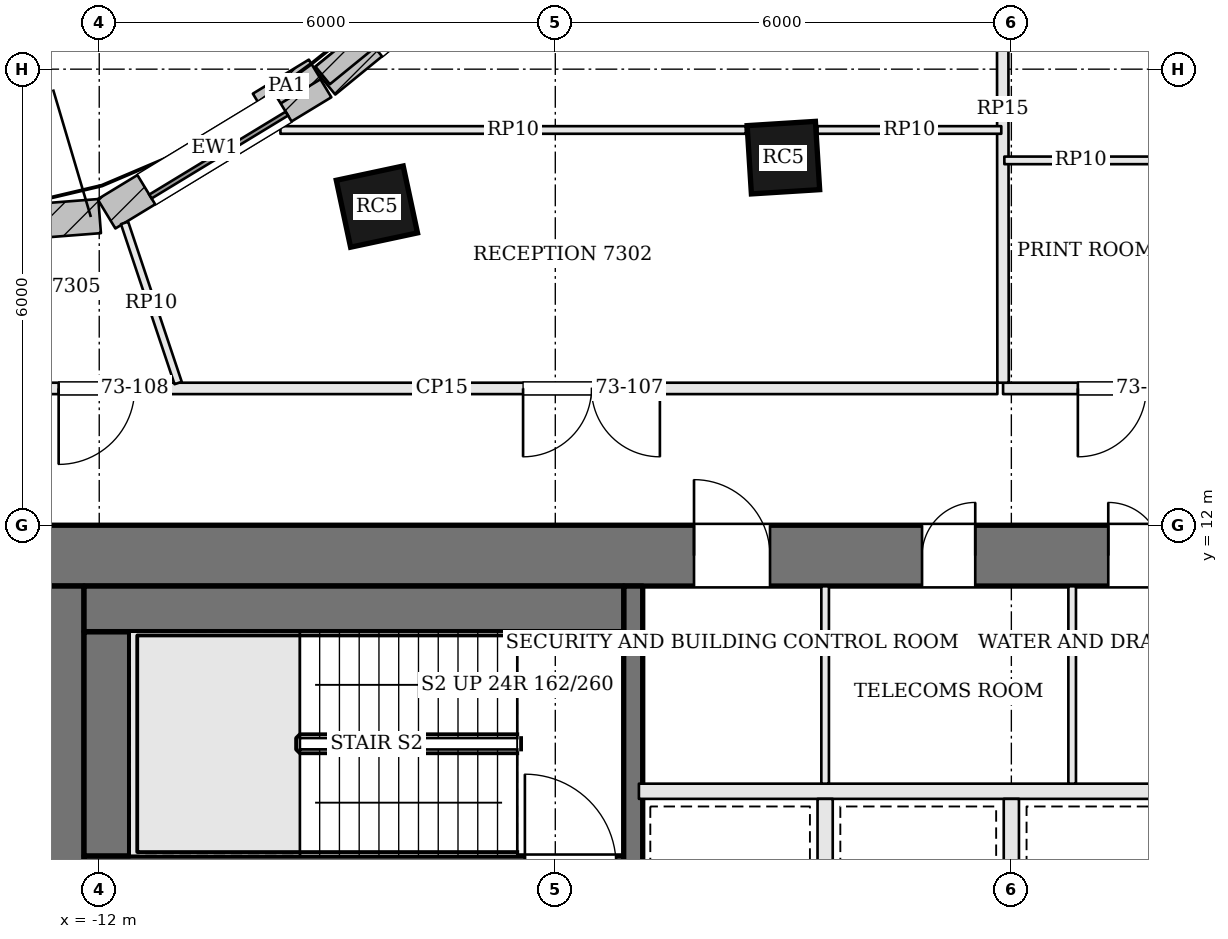
"""IFC4 building model, lengths in metres.
Left out: names, types, materials, properties, quantities, classifications, styles, units other than length and angle.
Written with IfcOpenShell. Run it as: python <this file> out.ifc"""

import sys

from ifc_helpers import new_model, si_unit, direction, frame, frame_2d, origin, origin_2d, place, context, subcontext, project, spatial, rectangle, extrude, element, fill, save


model = new_model("IFC4")
c1 = context("Model", 3, precision=1e-05, world=origin(), true_north=direction((0.0, 1.0)))
c2 = subcontext(c1, "Body", "Model", "MODEL_VIEW")
j1 = project(units=[si_unit("LENGTHUNIT", "METRE"), si_unit("PLANEANGLEUNIT", "RADIAN")], contexts=[c1])
p1 = place(None, origin())
s1 = spatial("IfcSite", under=j1, at=p1, CompositionType="ELEMENT")
p2 = place(p1, origin())
s2 = spatial("IfcBuilding", under=s1, at=p2, CompositionType="ELEMENT")
p3 = place(p2, frame((0.0, 0.0, 296.1)))
s3 = spatial("IfcBuildingStorey", under=s2, at=p3, CompositionType="ELEMENT", Elevation=296.1)
p4 = place(p3, frame((-13.0, 11.6, 0.0), z_axis=(0.0, 0.0, 1.0), x_axis=(1.0, 0.0, 0.0)))
e1 = element("IfcWall", 1, at=p4, inside=s3, PredefinedType="SHEAR", context=c2, shape_type="SweptSolid", body=[
    extrude(rectangle(XDim=26.0, YDim=0.8, at=frame_2d((13.0, 0.0))), origin(), (0.0, 0.0, 1.0), 3.9),
])
p5 = place(p4, frame((8.825, 0.0, 0.0)))
e2 = element("IfcOpeningElement", 2, at=p5, cuts=e1, PredefinedType="OPENING", context=c2, shape_type="SweptSolid", body=[
    extrude(rectangle(XDim=1.0, YDim=2.1, at=frame_2d((0.5, 1.05))), frame((0.0, 0.41, 0.0), z_axis=(0.0, -1.0, 0.0), x_axis=(1.0, 0.0, 0.0)), (0.0, 0.0, 1.0), 0.82),
])
p6 = place(p4, frame((11.825, 0.0, 0.0)))
e3 = element("IfcOpeningElement", 3, at=p6, cuts=e1, PredefinedType="OPENING", context=c2, shape_type="SweptSolid", body=[
    extrude(rectangle(XDim=0.7, YDim=2.1, at=frame_2d((0.35, 1.05))), frame((0.0, 0.41, 0.0), z_axis=(0.0, -1.0, 0.0), x_axis=(1.0, 0.0, 0.0)), (0.0, 0.0, 1.0), 0.82),
])
p7 = place(p4, frame((14.275, 0.0, 0.0)))
e4 = element("IfcOpeningElement", 4, at=p7, cuts=e1, PredefinedType="OPENING", context=c2, shape_type="SweptSolid", body=[
    extrude(rectangle(XDim=0.7, YDim=2.1, at=frame_2d((0.35, 1.05))), frame((0.0, 0.41, 0.0), z_axis=(0.0, -1.0, 0.0), x_axis=(1.0, 0.0, 0.0)), (0.0, 0.0, 1.0), 0.82),
])
p8 = place(p4, frame((16.175, 0.0, 0.0)))
e5 = element("IfcOpeningElement", 5, at=p8, cuts=e1, PredefinedType="OPENING", context=c2, shape_type="SweptSolid", body=[
    extrude(rectangle(XDim=1.0, YDim=2.1, at=frame_2d((0.5, 1.05))), frame((0.0, 0.41, 0.0), z_axis=(0.0, -1.0, 0.0), x_axis=(1.0, 0.0, 0.0)), (0.0, 0.0, 1.0), 0.82),
])
p9 = place(p3, frame((-12.6, -2.2, 0.0), z_axis=(0.0, 0.0, 1.0), x_axis=(0.0, 1.0, 0.0)))
e6 = element("IfcWall", 6, at=p9, inside=s3, PredefinedType="SHEAR", context=c2, shape_type="SweptSolid", body=[
    extrude(rectangle(XDim=13.4, YDim=0.8, at=frame_2d((6.7, 0.0))), origin(), (0.0, 0.0, 1.0), 3.9),
])
p10 = place(p9, frame((4.2, 0.0, 0.0)))
e7 = element("IfcOpeningElement", 7, at=p10, cuts=e6, PredefinedType="OPENING", context=c2, shape_type="SweptSolid", body=[
    extrude(rectangle(XDim=1.8, YDim=2.1, at=frame_2d((0.9, 1.05))), frame((0.0, 0.41, 0.0), z_axis=(0.0, -1.0, 0.0), x_axis=(1.0, 0.0, 0.0)), (0.0, 0.0, 1.0), 0.82),
])
for number, where, z_axis, x_axis in (
    (8, (-2.999, 16.836, 0.0), (0.0, 0.0, 1.0), (-0.998, -0.062, 0.0)),
    (9, (-8.347, 16.192, 0.0), (0.0, 0.0, 1.0), (-0.978, -0.209, 0.0)),
):
    element("IfcColumn", number, at=place(p3, frame(where, z_axis=z_axis, x_axis=x_axis)), inside=s3, PredefinedType="COLUMN", context=c2, shape_type="SweptSolid", body=[
        extrude(rectangle(XDim=0.9, YDim=0.9, at=origin_2d()), origin(), (0.0, 0.0, 1.0), 3.9),
    ])
p11 = place(p3, frame((-6.411, 19.983, 0.0), z_axis=(0.0, 0.0, 1.0), x_axis=(-0.774810240287, -0.632193871804, 0.0)))
e10 = element("IfcWall", 10, at=p11, inside=s3, PredefinedType="SOLIDWALL", context=c2, shape_type="SweptSolid", body=[
    extrude(rectangle(XDim=3.389, YDim=0.45, at=frame_2d((1.695, 0.0))), origin(), (0.0, 0.0, 1.0), 3.7),
])
p12 = place(p11, frame((0.795, 0.0, 0.9)))
e11 = element("IfcOpeningElement", 11, at=p12, cuts=e10, PredefinedType="OPENING", context=c2, shape_type="SweptSolid", body=[
    extrude(rectangle(XDim=1.8, YDim=2.3, at=frame_2d((0.9, 1.15))), frame((0.0, 0.235, 0.0), z_axis=(0.0, -1.0, 0.0), x_axis=(1.0, 0.0, 0.0)), (0.0, 0.0, 1.0), 0.47),
])
p13 = place(p3, frame((-9.063, 17.823, 0.0), z_axis=(0.0, 0.0, 1.0), x_axis=(-0.854622263029, -0.519250216693, 0.0)))
e12 = element("IfcWall", 12, at=p13, inside=s3, PredefinedType="SOLIDWALL", context=c2, shape_type="SweptSolid", body=[
    extrude(rectangle(XDim=3.325, YDim=0.45, at=frame_2d((1.662, 0.0))), origin(), (0.0, 0.0, 1.0), 3.7),
])
p14 = place(p13, frame((0.612, 0.0, 0.9)))
e13 = element("IfcOpeningElement", 13, at=p14, cuts=e12, PredefinedType="OPENING", context=c2, shape_type="SweptSolid", body=[
    extrude(rectangle(XDim=2.1, YDim=2.3, at=frame_2d((1.05, 1.15))), frame((0.0, 0.235, 0.0), z_axis=(0.0, -1.0, 0.0), x_axis=(1.0, 0.0, 0.0)), (0.0, 0.0, 1.0), 0.47),
])
p15 = place(p3, frame((-11.995, 16.067, 0.0), z_axis=(0.0, 0.0, 1.0), x_axis=(-0.996967993416, -0.077812724559, 0.0)))
e14 = element("IfcWall", 14, at=p15, inside=s3, PredefinedType="SOLIDWALL", context=c2, shape_type="SweptSolid", body=[
    extrude(rectangle(XDim=4.047, YDim=0.45, at=frame_2d((2.024, 0.0))), origin(), (0.0, 0.0, 1.0), 3.7),
])
p16 = place(p15, frame((0.974, 0.0, 0.9)))
e15 = element("IfcOpeningElement", 15, at=p16, cuts=e14, PredefinedType="OPENING", context=c2, shape_type="SweptSolid", body=[
    extrude(rectangle(XDim=2.1, YDim=2.3, at=frame_2d((1.05, 1.15))), frame((0.0, 0.235, 0.0), z_axis=(0.0, -1.0, 0.0), x_axis=(1.0, 0.0, 0.0)), (0.0, 0.0, 1.0), 0.47),
])
p17 = place(p3, frame((-6.505, 20.003, 3.9), z_axis=(0.0, 0.0, 1.0), x_axis=(-0.774774389425, -0.632237807705, 0.0)))
e16 = element("IfcWall", 16, at=p17, inside=s3, PredefinedType="PARAPET", context=c2, shape_type="SweptSolid", body=[
    extrude(rectangle(XDim=3.299, YDim=0.3, at=frame_2d((1.649, 0.0))), origin(), (0.0, 0.0, 1.0), 1.1),
])
p18 = place(p3, frame((-9.164, 17.997, 3.9), z_axis=(0.0, 0.0, 1.0), x_axis=(-0.854630396294, -0.519236830098, 0.0)))
e17 = element("IfcWall", 17, at=p18, inside=s3, PredefinedType="PARAPET", context=c2, shape_type="SweptSolid", body=[
    extrude(rectangle(XDim=0.862, YDim=0.3, at=frame_2d((0.431, 0.0))), origin(), (0.0, 0.0, 1.0), 1.1),
])
p19 = place(p3, frame((-12.2, 7.525, 0.0), z_axis=(0.0, 0.0, 1.0), x_axis=(1.0, 0.0, 0.0)))
e18 = element("IfcWall", 18, at=p19, inside=s3, PredefinedType="SOLIDWALL", context=c2, shape_type="SweptSolid", body=[
    extrude(rectangle(XDim=7.1, YDim=0.25, at=frame_2d((3.55, 0.0))), origin(), (0.0, 0.0, 1.0), 3.7),
])
p20 = place(p19, frame((5.8, 0.0, 0.0)))
e19 = element("IfcOpeningElement", 19, at=p20, cuts=e18, PredefinedType="OPENING", context=c2, shape_type="SweptSolid", body=[
    extrude(rectangle(XDim=1.2, YDim=2.1, at=frame_2d((0.6, 1.05))), frame((0.0, 0.135, 0.0), z_axis=(0.0, -1.0, 0.0), x_axis=(1.0, 0.0, 0.0)), (0.0, 0.0, 1.0), 0.27),
])
p21 = place(p3, frame((-4.975, -2.2, 0.0), z_axis=(0.0, 0.0, 1.0), x_axis=(0.0, 1.0, 0.0)))
e20 = element("IfcWall", 20, at=p21, inside=s3, PredefinedType="SOLIDWALL", context=c2, shape_type="SweptSolid", body=[
    extrude(rectangle(XDim=13.4, YDim=0.25, at=frame_2d((6.7, 0.0))), origin(), (0.0, 0.0, 1.0), 3.7),
])
p22 = place(p21, frame((5.25, 0.0, 0.0)))
e21 = element("IfcOpeningElement", 21, at=p22, cuts=e20, PredefinedType="OPENING", context=c2, shape_type="SweptSolid", body=[
    extrude(rectangle(XDim=1.2, YDim=2.1, at=frame_2d((0.6, 1.05))), frame((0.0, 0.135, 0.0), z_axis=(0.0, -1.0, 0.0), x_axis=(1.0, 0.0, 0.0)), (0.0, 0.0, 1.0), 0.27),
])
p23 = place(p3, frame((-11.9, 7.65, 0.0), z_axis=(0.0, 0.0, 1.0), x_axis=(0.0, 1.0, 0.0)))
e22 = element("IfcWall", 22, at=p23, inside=s3, PredefinedType="SOLIDWALL", context=c2, shape_type="SweptSolid", body=[
    extrude(rectangle(XDim=2.95, YDim=0.6, at=frame_2d((1.475, 0.0))), origin(), (0.0, 0.0, 1.0), 3.7),
])
p24 = place(p3, frame((-12.2, 10.9, 0.0), z_axis=(0.0, 0.0, 1.0), x_axis=(1.0, 0.0, 0.0)))
e23 = element("IfcWall", 23, at=p24, inside=s3, PredefinedType="SOLIDWALL", context=c2, shape_type="SweptSolid", body=[
    extrude(rectangle(XDim=7.1, YDim=0.6, at=frame_2d((3.55, 0.0))), origin(), (0.0, 0.0, 1.0), 3.7),
])
p25 = place(p3, frame((-4.9, 8.5, 0.0), z_axis=(0.0, 0.0, 1.0), x_axis=(1.0, 0.0, 0.0)))
e24 = element("IfcWall", 24, at=p25, inside=s3, PredefinedType="SOLIDWALL", context=c2, shape_type="SweptSolid", body=[
    extrude(rectangle(XDim=9.8, YDim=0.2, at=frame_2d((4.9, 0.0))), origin(), (0.0, 0.0, 1.0), 3.7),
])
for number, where, z_axis, x_axis in (
    (25, (-2.45, 6.2, 0.0), (0.0, 0.0, 1.0), (0.0, 1.0, 0.0)),
    (26, (0.0, 6.2, 0.0), (0.0, 0.0, 1.0), (0.0, 1.0, 0.0)),
):
    element("IfcWall", number, at=place(p3, frame(where, z_axis=z_axis, x_axis=x_axis)), inside=s3, PredefinedType="SOLIDWALL", context=c2, shape_type="SweptSolid", body=[
        extrude(rectangle(XDim=2.2, YDim=0.2, at=frame_2d((1.1, 0.0))), origin(), (0.0, 0.0, 1.0), 3.7),
    ])
for number, where, z_axis, x_axis in (
    (27, (-2.45, 8.6, 0.0), (0.0, 0.0, 1.0), (0.0, 1.0, 0.0)),
    (28, (0.8, 8.6, 0.0), (0.0, 0.0, 1.0), (0.0, 1.0, 0.0)),
):
    element("IfcWall", number, at=place(p3, frame(where, z_axis=z_axis, x_axis=x_axis)), inside=s3, PredefinedType="PARTITIONING", context=c2, shape_type="SweptSolid", body=[
        extrude(rectangle(XDim=2.6, YDim=0.1, at=frame_2d((1.3, 0.0))), origin(), (0.0, 0.0, 1.0), 3.7),
    ])
p26 = place(p3, frame((14.725, 13.8, 0.0), z_axis=(0.0, 0.0, 1.0), x_axis=(-1.0, 0.0, 0.0)))
e29 = element("IfcWall", 29, at=p26, inside=s3, PredefinedType="PARTITIONING", context=c2, shape_type="SweptSolid", body=[
    extrude(rectangle(XDim=14.834, YDim=0.15, at=frame_2d((7.417, 0.0))), origin(), (0.0, 0.0, 1.0), 3.198),
])
p27 = place(p26, frame((3.1, 0.0, 0.0)))
e30 = element("IfcOpeningElement", 30, at=p27, cuts=e29, PredefinedType="OPENING", context=c2, shape_type="SweptSolid", body=[
    extrude(rectangle(XDim=1.0, YDim=2.4, at=frame_2d((0.5, 1.2))), frame((0.0, 0.085, 0.0), z_axis=(0.0, -1.0, 0.0), x_axis=(1.0, 0.0, 0.0)), (0.0, 0.0, 1.0), 0.17),
])
p28 = place(p26, frame((4.5, 0.0, 0.0)))
e31 = element("IfcOpeningElement", 31, at=p28, cuts=e29, PredefinedType="OPENING", context=c2, shape_type="SweptSolid", body=[
    extrude(rectangle(XDim=1.0, YDim=2.4, at=frame_2d((0.5, 1.2))), frame((0.0, 0.085, 0.0), z_axis=(0.0, -1.0, 0.0), x_axis=(1.0, 0.0, 0.0)), (0.0, 0.0, 1.0), 0.17),
])
p29 = place(p26, frame((8.75, 0.0, 0.0)))
e32 = element("IfcOpeningElement", 32, at=p29, cuts=e29, PredefinedType="OPENING", context=c2, shape_type="SweptSolid", body=[
    extrude(rectangle(XDim=1.0, YDim=2.1, at=frame_2d((0.5, 1.05))), frame((0.0, 0.085, 0.0), z_axis=(0.0, -1.0, 0.0), x_axis=(1.0, 0.0, 0.0)), (0.0, 0.0, 1.0), 0.17),
])
p30 = place(p26, frame((12.95, 0.0, 0.0)))
e33 = element("IfcOpeningElement", 33, at=p30, cuts=e29, PredefinedType="OPENING", context=c2, shape_type="SweptSolid", body=[
    extrude(rectangle(XDim=0.9, YDim=2.1, at=frame_2d((0.45, 1.05))), frame((0.0, 0.085, 0.0), z_axis=(0.0, -1.0, 0.0), x_axis=(1.0, 0.0, 0.0)), (0.0, 0.0, 1.0), 0.17),
])
p31 = place(p3, frame((-0.117, 21.087, 0.0), z_axis=(0.0, 0.0, 1.0), x_axis=(0.001083202939, -0.999999413336, 0.0)))
e34 = element("IfcWall", 34, at=p31, inside=s3, PredefinedType="PARTITIONING", context=c2, shape_type="SweptSolid", body=[
    extrude(rectangle(XDim=7.212, YDim=0.15, at=frame_2d((3.606, 0.0))), origin(), (0.0, 0.0, 1.0), 3.234),
])
p32 = place(p3, frame((-0.184, 13.8, 0.0), z_axis=(0.0, 0.0, 1.0), x_axis=(-1.0, 0.0, 0.0)))
e35 = element("IfcWall", 35, at=p32, inside=s3, PredefinedType="PARTITIONING", context=c2, shape_type="SweptSolid", body=[
    extrude(rectangle(XDim=14.616, YDim=0.15, at=frame_2d((7.308, 0.0))), origin(), (0.0, 0.0, 1.0), 3.198),
])
p33 = place(p32, frame((4.44, 0.0, 0.0)))
e36 = element("IfcOpeningElement", 36, at=p33, cuts=e35, PredefinedType="OPENING", context=c2, shape_type="SweptSolid", body=[
    extrude(rectangle(XDim=1.8, YDim=2.1, at=frame_2d((0.9, 1.05))), frame((0.0, 0.085, 0.0), z_axis=(0.0, -1.0, 0.0), x_axis=(1.0, 0.0, 0.0)), (0.0, 0.0, 1.0), 0.17),
])
p34 = place(p32, frame((11.35, 0.0, 0.0)))
e37 = element("IfcOpeningElement", 37, at=p34, cuts=e35, PredefinedType="OPENING", context=c2, shape_type="SweptSolid", body=[
    extrude(rectangle(XDim=1.0, YDim=2.4, at=frame_2d((0.5, 1.2))), frame((0.0, 0.085, 0.0), z_axis=(0.0, -1.0, 0.0), x_axis=(1.0, 0.0, 0.0)), (0.0, 0.0, 1.0), 0.17),
])
p35 = place(p3, frame((-0.092, 16.8, 0.0), z_axis=(0.0, 0.0, 1.0), x_axis=(1.0, 0.0, 0.0)))
e38 = element("IfcWall", 38, at=p35, inside=s3, PredefinedType="PARTITIONING", context=c2, shape_type="SweptSolid", body=[
    extrude(rectangle(XDim=2.01, YDim=0.1, at=frame_2d((1.005, 0.0))), origin(), (0.0, 0.0, 1.0), 3.184),
])
p36 = place(p3, frame((-9.616, 17.2, 0.0), z_axis=(0.0, 0.0, 1.0), x_axis=(1.0, 0.0, 0.0)))
e39 = element("IfcWall", 39, at=p36, inside=s3, PredefinedType="PARTITIONING", context=c2, shape_type="SweptSolid", body=[
    extrude(rectangle(XDim=6.124, YDim=0.1, at=frame_2d((3.062, 0.0))), origin(), (0.0, 0.0, 1.0), 3.184),
])
p37 = place(p3, frame((-2.551, 17.2, 0.0), z_axis=(0.0, 0.0, 1.0), x_axis=(1.0, 0.0, 0.0)))
e40 = element("IfcWall", 40, at=p37, inside=s3, PredefinedType="PARTITIONING", context=c2, shape_type="SweptSolid", body=[
    extrude(rectangle(XDim=2.418, YDim=0.1, at=frame_2d((1.209, 0.0))), origin(), (0.0, 0.0, 1.0), 3.184),
])
p38 = place(p3, frame((-10.962, 13.871, 0.0), z_axis=(0.0, 0.0, 1.0), x_axis=(-0.317447611302, 0.948275811185, 0.0)))
e41 = element("IfcWall", 41, at=p38, inside=s3, PredefinedType="PARTITIONING", context=c2, shape_type="SweptSolid", body=[
    extrude(rectangle(XDim=2.221, YDim=0.1, at=frame_2d((1.111, 0.0))), origin(), (0.0, 0.0, 1.0), 3.184),
])
p39 = place(p14, origin())
e42 = element("IfcWindow", 42, at=p39, inside=s3, PartitioningType="SINGLE_PANEL", PredefinedType="WINDOW", context=c2, shape_type="SweptSolid", body=[
    extrude(rectangle(XDim=2.1, YDim=2.3, at=frame_2d((1.05, 1.15))), frame((0.0, 0.135, 0.0), z_axis=(0.0, -1.0, 0.0), x_axis=(1.0, 0.0, 0.0)), (0.0, 0.0, 1.0), 0.06),
])
fill(e13, e42)
p40 = place(p5, origin())
e43 = element("IfcDoor", 43, at=p40, inside=s3, OperationType="SINGLE_SWING_LEFT", PredefinedType="DOOR", context=c2, shape_type="SweptSolid", body=[
    extrude(rectangle(XDim=1.0, YDim=2.1, at=frame_2d((0.5, 1.05))), frame((0.0, 0.025, 0.0), z_axis=(0.0, -1.0, 0.0), x_axis=(1.0, 0.0, 0.0)), (0.0, 0.0, 1.0), 0.05),
])
fill(e2, e43)
p41 = place(p6, origin())
e44 = element("IfcDoor", 44, at=p41, inside=s3, OperationType="SINGLE_SWING_RIGHT", PredefinedType="DOOR", context=c2, shape_type="SweptSolid", body=[
    extrude(rectangle(XDim=0.7, YDim=2.1, at=frame_2d((0.35, 1.05))), frame((0.0, 0.025, 0.0), z_axis=(0.0, -1.0, 0.0), x_axis=(1.0, 0.0, 0.0)), (0.0, 0.0, 1.0), 0.05),
])
fill(e3, e44)
p42 = place(p7, origin())
e45 = element("IfcDoor", 45, at=p42, inside=s3, OperationType="SINGLE_SWING_LEFT", PredefinedType="DOOR", context=c2, shape_type="SweptSolid", body=[
    extrude(rectangle(XDim=0.7, YDim=2.1, at=frame_2d((0.35, 1.05))), frame((0.0, 0.025, 0.0), z_axis=(0.0, -1.0, 0.0), x_axis=(1.0, 0.0, 0.0)), (0.0, 0.0, 1.0), 0.05),
])
fill(e4, e45)
p43 = place(p33, origin())
e46 = element("IfcDoor", 46, at=p43, inside=s3, OperationType="DOUBLE_DOOR_SINGLE_SWING", PredefinedType="DOOR", context=c2, shape_type="SweptSolid", body=[
    extrude(rectangle(XDim=1.8, YDim=2.1, at=frame_2d((0.9, 1.05))), frame((0.0, 0.025, 0.0), z_axis=(0.0, -1.0, 0.0), x_axis=(1.0, 0.0, 0.0)), (0.0, 0.0, 1.0), 0.05),
])
fill(e36, e46)
p44 = place(p34, origin())
e47 = element("IfcDoor", 47, at=p44, inside=s3, OperationType="SINGLE_SWING_RIGHT", PredefinedType="DOOR", context=c2, shape_type="SweptSolid", body=[
    extrude(rectangle(XDim=1.0, YDim=2.4, at=frame_2d((0.5, 1.2))), frame((0.0, 0.025, 0.0), z_axis=(0.0, -1.0, 0.0), x_axis=(1.0, 0.0, 0.0)), (0.0, 0.0, 1.0), 0.05),
])
fill(e37, e47)
p45 = place(p30, origin())
e48 = element("IfcDoor", 48, at=p45, inside=s3, OperationType="SINGLE_SWING_RIGHT", PredefinedType="DOOR", context=c2, shape_type="SweptSolid", body=[
    extrude(rectangle(XDim=0.9, YDim=2.1, at=frame_2d((0.45, 1.05))), frame((0.0, 0.025, 0.0), z_axis=(0.0, -1.0, 0.0), x_axis=(1.0, 0.0, 0.0)), (0.0, 0.0, 1.0), 0.05),
])
fill(e33, e48)
save(model, sys.argv[1])
